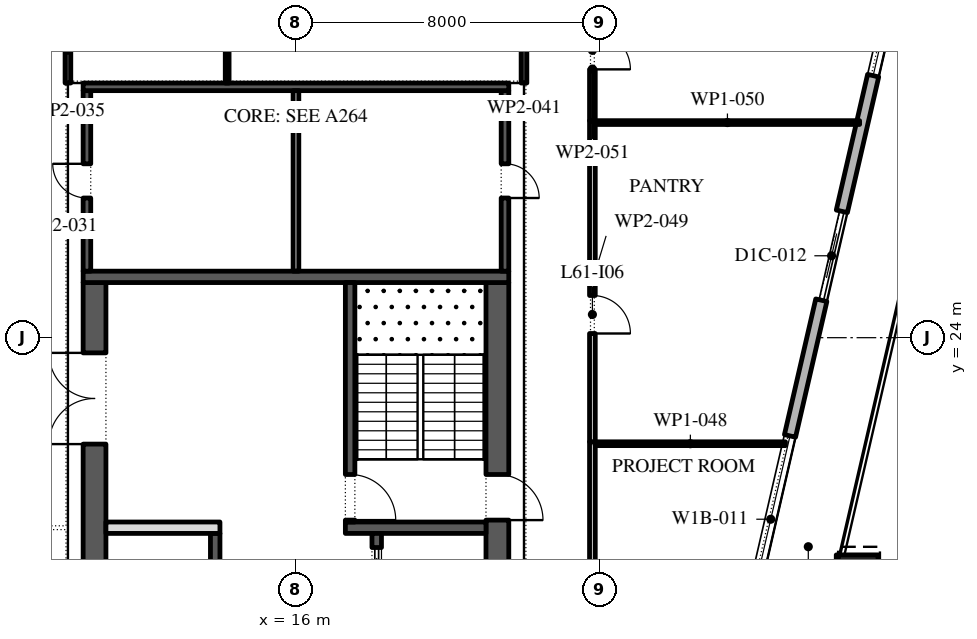
"""IFC4 building model, lengths in metres.
Left out: names, types, materials, properties, quantities, classifications, styles, units other than length and angle.
Written with IfcOpenShell. Run it as: python <this file> out.ifc"""

import sys

from ifc_helpers import new_model, si_unit, direction, frame, frame_2d, origin, origin_2d, place, context, subcontext, project, spatial, rectangle, extrude, element, fill, save


model = new_model("IFC4")
c1 = context("Model", 3, precision=1e-05, world=origin(), true_north=direction((0.0, 1.0)))
c2 = subcontext(c1, "Body", "Model", "MODEL_VIEW")
j1 = project(units=[si_unit("LENGTHUNIT", "METRE"), si_unit("PLANEANGLEUNIT", "RADIAN")], contexts=[c1])
p1 = place(None, origin())
s1 = spatial("IfcSite", under=j1, at=p1, CompositionType="ELEMENT")
p2 = place(p1, origin())
s2 = spatial("IfcBuilding", under=s1, at=p2, CompositionType="ELEMENT")
p3 = place(p2, frame((0.0, 0.0, 280.8)))
s3 = spatial("IfcBuildingStorey", under=s2, at=p3, CompositionType="ELEMENT", Elevation=280.8)
p4 = place(p3, frame((30.766, 17.735, 0.0), z_axis=(0.011668267153, 0.050562490995, 0.998652735462), x_axis=(-0.974391195695, 0.224859506699, 0.0)))
e1 = element("IfcColumn", 1, at=p4, inside=s3, PredefinedType="COLUMN", context=c2, shape_type="SweptSolid", body=[
    extrude(rectangle(XDim=1.1, YDim=1.1, at=origin_2d()), origin(), (0.0, 0.0, 1.0), 4.206),
])
p5 = place(p3, frame((21.359, -11.678, 0.0), z_axis=(0.0, 0.0, 1.0), x_axis=(0.224949198343, 0.974370493275, 0.0)))
e2 = element("IfcWall", 2, at=p5, inside=s3, PredefinedType="STANDARD", context=c2, shape_type="SweptSolid", body=[
    extrude(rectangle(XDim=49.5, YDim=0.3, at=frame_2d((24.75, 0.0))), origin(), (0.0, 0.0, 1.0), 4.0),
])
p6 = place(p5, frame((1.157, 0.0, 0.45)))
e3 = element("IfcOpeningElement", 3, at=p6, cuts=e2, PredefinedType="OPENING", context=c2, shape_type="SweptSolid", body=[
    extrude(rectangle(XDim=4.5, YDim=3.05, at=frame_2d((2.25, 1.525))), frame((0.0, 0.16, 0.0), z_axis=(0.0, -1.0, 0.0), x_axis=(1.0, 0.0, 0.0)), (0.0, 0.0, 1.0), 0.32),
])
p7 = place(p5, frame((8.121, 0.0, 0.45)))
e4 = element("IfcOpeningElement", 4, at=p7, cuts=e2, PredefinedType="OPENING", context=c2, shape_type="SweptSolid", body=[
    extrude(rectangle(XDim=4.5, YDim=3.05, at=frame_2d((2.25, 1.525))), frame((0.0, 0.16, 0.0), z_axis=(0.0, -1.0, 0.0), x_axis=(1.0, 0.0, 0.0)), (0.0, 0.0, 1.0), 0.32),
])
p8 = place(p5, frame((15.236, 0.0, 0.45)))
e5 = element("IfcOpeningElement", 5, at=p8, cuts=e2, PredefinedType="OPENING", context=c2, shape_type="SweptSolid", body=[
    extrude(rectangle(XDim=4.5, YDim=3.05, at=frame_2d((2.25, 1.525))), frame((0.0, 0.16, 0.0), z_axis=(0.0, -1.0, 0.0), x_axis=(1.0, 0.0, 0.0)), (0.0, 0.0, 1.0), 0.32),
])
p9 = place(p5, frame((22.35, 0.0, 0.45)))
e6 = element("IfcOpeningElement", 6, at=p9, cuts=e2, PredefinedType="OPENING", context=c2, shape_type="SweptSolid", body=[
    extrude(rectangle(XDim=4.5, YDim=3.05, at=frame_2d((2.25, 1.525))), frame((0.0, 0.16, 0.0), z_axis=(0.0, -1.0, 0.0), x_axis=(1.0, 0.0, 0.0)), (0.0, 0.0, 1.0), 0.32),
])
p10 = place(p5, frame((29.464, 0.0, 0.45)))
e7 = element("IfcOpeningElement", 7, at=p10, cuts=e2, PredefinedType="OPENING", context=c2, shape_type="SweptSolid", body=[
    extrude(rectangle(XDim=4.5, YDim=2.95, at=frame_2d((2.25, 1.475))), frame((0.0, 0.16, 0.0), z_axis=(0.0, -1.0, 0.0), x_axis=(1.0, 0.0, 0.0)), (0.0, 0.0, 1.0), 0.32),
])
p11 = place(p5, frame((37.628, 0.0, 0.0)))
e8 = element("IfcOpeningElement", 8, at=p11, cuts=e2, PredefinedType="OPENING", context=c2, shape_type="SweptSolid", body=[
    extrude(rectangle(XDim=2.4, YDim=3.325, at=frame_2d((1.2, 1.663))), frame((0.0, 0.16, 0.0), z_axis=(0.0, -1.0, 0.0), x_axis=(1.0, 0.0, 0.0)), (0.0, 0.0, 1.0), 0.32),
])
p12 = place(p5, frame((43.693, 0.0, 0.45)))
e9 = element("IfcOpeningElement", 9, at=p12, cuts=e2, PredefinedType="OPENING", context=c2, shape_type="SweptSolid", body=[
    extrude(rectangle(XDim=4.5, YDim=2.575, at=frame_2d((2.25, 1.288))), frame((0.0, 0.16, 0.0), z_axis=(0.0, -1.0, 0.0), x_axis=(1.0, 0.0, 0.0)), (0.0, 0.0, 1.0), 0.32),
])
p13 = place(p3, frame((21.3, -2.45, 0.0), z_axis=(0.0, 0.0, 1.0), x_axis=(0.0, 1.0, 0.0)))
e10 = element("IfcWall", 10, at=p13, inside=s3, PredefinedType="SHEAR", context=c2, shape_type="SweptSolid", body=[
    extrude(rectangle(XDim=27.9, YDim=0.6, at=frame_2d((13.95, 0.0))), origin(), (0.0, 0.0, 1.0), 4.0),
])
p14 = place(p13, frame((5.05, 0.0, 0.0)))
e11 = element("IfcOpeningElement", 11, at=p14, cuts=e10, PredefinedType="OPENING", context=c2, shape_type="SweptSolid", body=[
    extrude(rectangle(XDim=1.2, YDim=2.1, at=frame_2d((0.6, 1.05))), frame((0.0, 0.31, 0.0), z_axis=(0.0, -1.0, 0.0), x_axis=(1.0, 0.0, 0.0)), (0.0, 0.0, 1.0), 0.62),
])
p15 = place(p13, frame((21.65, 0.0, 0.0)))
e12 = element("IfcOpeningElement", 12, at=p15, cuts=e10, PredefinedType="OPENING", context=c2, shape_type="SweptSolid", body=[
    extrude(rectangle(XDim=1.2, YDim=2.1, at=frame_2d((0.6, 1.05))), frame((0.0, 0.31, 0.0), z_axis=(0.0, -1.0, 0.0), x_axis=(1.0, 0.0, 0.0)), (0.0, 0.0, 1.0), 0.62),
])
p16 = place(p3, frame((10.7, -2.45, 0.0), z_axis=(0.0, 0.0, 1.0), x_axis=(0.0, 1.0, 0.0)))
e13 = element("IfcWall", 13, at=p16, inside=s3, PredefinedType="SHEAR", context=c2, shape_type="SweptSolid", body=[
    extrude(rectangle(XDim=27.9, YDim=0.6, at=frame_2d((13.95, 0.0))), origin(), (0.0, 0.0, 1.0), 4.0),
])
p17 = place(p16, frame((23.65, 0.0, 0.0)))
e14 = element("IfcOpeningElement", 14, at=p17, cuts=e13, PredefinedType="OPENING", context=c2, shape_type="SweptSolid", body=[
    extrude(rectangle(XDim=2.4, YDim=2.1, at=frame_2d((1.2, 1.05))), frame((0.0, 0.31, 0.0), z_axis=(0.0, -1.0, 0.0), x_axis=(1.0, 0.0, 0.0)), (0.0, 0.0, 1.0), 0.62),
])
p18 = place(p16, frame((1.087, 0.0, 0.0)))
e15 = element("IfcOpeningElement", 15, at=p18, cuts=e13, PredefinedType="OPENING", context=c2, shape_type="SweptSolid", body=[
    extrude(rectangle(XDim=0.9, YDim=2.1, at=frame_2d((0.45, 1.05))), frame((0.0, 0.31, 0.0), z_axis=(0.0, -1.0, 0.0), x_axis=(1.0, 0.0, 0.0)), (0.0, 0.0, 1.0), 0.62),
])
p19 = place(p16, frame((4.262, 0.0, 0.0)))
e16 = element("IfcOpeningElement", 16, at=p19, cuts=e13, PredefinedType="OPENING", context=c2, shape_type="SweptSolid", body=[
    extrude(rectangle(XDim=1.0, YDim=2.1, at=frame_2d((0.5, 1.05))), frame((0.0, 0.31, 0.0), z_axis=(0.0, -1.0, 0.0), x_axis=(1.0, 0.0, 0.0)), (0.0, 0.0, 1.0), 0.62),
])
p20 = place(p3, frame((10.4, 25.6, 0.0), z_axis=(0.0, 0.0, 1.0), x_axis=(1.0, 0.0, 0.0)))
e17 = element("IfcWall", 17, at=p20, inside=s3, PredefinedType="SHEAR", context=c2, shape_type="SweptSolid", body=[
    extrude(rectangle(XDim=11.2, YDim=0.3, at=frame_2d((5.6, 0.0))), origin(), (0.0, 0.0, 1.0), 4.0),
])
p21 = place(p3, frame((17.3, 19.0, 0.0), z_axis=(0.0, 0.0, 1.0), x_axis=(1.0, 0.0, 0.0)))
e18 = element("IfcWall", 18, at=p21, inside=s3, PredefinedType="SHEAR", context=c2, shape_type="SweptSolid", body=[
    extrude(rectangle(XDim=3.7, YDim=0.3, at=frame_2d((1.85, 0.0))), origin(), (0.0, 0.0, 1.0), 4.0),
])
p22 = place(p3, frame((17.425, 19.15, 0.0), z_axis=(0.0, 0.0, 1.0), x_axis=(0.0, 1.0, 0.0)))
e19 = element("IfcWall", 19, at=p22, inside=s3, PredefinedType="SHEAR", context=c2, shape_type="SweptSolid", body=[
    extrude(rectangle(XDim=6.3, YDim=0.25, at=frame_2d((3.15, 0.0))), origin(), (0.0, 0.0, 1.0), 4.0),
])
p23 = place(p22, frame((0.05, 0.0, 0.0)))
e20 = element("IfcOpeningElement", 20, at=p23, cuts=e19, PredefinedType="OPENING", context=c2, shape_type="SweptSolid", body=[
    extrude(rectangle(XDim=1.2, YDim=2.1, at=frame_2d((0.6, 1.05))), frame((0.0, 0.135, 0.0), z_axis=(0.0, -1.0, 0.0), x_axis=(1.0, 0.0, 0.0)), (0.0, 0.0, 1.0), 0.27),
])
p24 = place(p3, frame((18.125, 4.15, 0.0), z_axis=(0.0, 0.0, 1.0), x_axis=(0.0, 1.0, 0.0)))
e21 = element("IfcWall", 21, at=p24, inside=s3, PredefinedType="SHEAR", context=c2, shape_type="SweptSolid", body=[
    extrude(rectangle(XDim=14.7, YDim=0.25, at=frame_2d((7.35, 0.0))), origin(), (0.0, 0.0, 1.0), 4.0),
])
p25 = place(p24, frame((3.246, 0.0, 0.0)))
e22 = element("IfcOpeningElement", 22, at=p25, cuts=e21, PredefinedType="OPENING", context=c2, shape_type="SweptSolid", body=[
    extrude(rectangle(XDim=0.9, YDim=2.1, at=frame_2d((0.45, 1.05))), frame((0.0, 0.135, 0.0), z_axis=(0.0, -1.0, 0.0), x_axis=(1.0, 0.0, 0.0)), (0.0, 0.0, 1.0), 0.27),
])
p26 = place(p24, frame((8.454, 0.0, 0.0)))
e23 = element("IfcOpeningElement", 23, at=p26, cuts=e21, PredefinedType="OPENING", context=c2, shape_type="SweptSolid", body=[
    extrude(rectangle(XDim=0.9, YDim=2.1, at=frame_2d((0.45, 1.05))), frame((0.0, 0.135, 0.0), z_axis=(0.0, -1.0, 0.0), x_axis=(1.0, 0.0, 0.0)), (0.0, 0.0, 1.0), 0.27),
])
p27 = place(p24, frame((0.371, 0.0, 0.0)))
e24 = element("IfcOpeningElement", 24, at=p27, cuts=e21, PredefinedType="OPENING", context=c2, shape_type="SweptSolid", body=[
    extrude(rectangle(XDim=1.1, YDim=2.1, at=frame_2d((0.55, 1.05))), frame((0.0, 0.135, 0.0), z_axis=(0.0, -1.0, 0.0), x_axis=(1.0, 0.0, 0.0)), (0.0, 0.0, 1.0), 0.27),
])
p28 = place(p24, frame((13.229, 0.0, 0.0)))
e25 = element("IfcOpeningElement", 25, at=p28, cuts=e21, PredefinedType="OPENING", context=c2, shape_type="SweptSolid", body=[
    extrude(rectangle(XDim=1.1, YDim=2.1, at=frame_2d((0.55, 1.05))), frame((0.0, 0.135, 0.0), z_axis=(0.0, -1.0, 0.0), x_axis=(1.0, 0.0, 0.0)), (0.0, 0.0, 1.0), 0.27),
])
p29 = place(p3, frame((13.875, -2.45, 0.0), z_axis=(0.0, 0.0, 1.0), x_axis=(0.0, 1.0, 0.0)))
e26 = element("IfcWall", 26, at=p29, inside=s3, PredefinedType="SHEAR", context=c2, shape_type="SweptSolid", body=[
    extrude(rectangle(XDim=21.3, YDim=0.25, at=frame_2d((10.65, 0.0))), origin(), (0.0, 0.0, 1.0), 4.0),
])
p30 = place(p29, frame((16.261, 0.0, 0.0)))
e27 = element("IfcOpeningElement", 27, at=p30, cuts=e26, PredefinedType="OPENING", context=c2, shape_type="SweptSolid", body=[
    extrude(rectangle(XDim=0.9, YDim=2.1, at=frame_2d((0.45, 1.05))), frame((0.0, 0.135, 0.0), z_axis=(0.0, -1.0, 0.0), x_axis=(1.0, 0.0, 0.0)), (0.0, 0.0, 1.0), 0.27),
])
p31 = place(p29, frame((19.325, 0.0, 0.0)))
e28 = element("IfcOpeningElement", 28, at=p31, cuts=e26, PredefinedType="OPENING", context=c2, shape_type="SweptSolid", body=[
    extrude(rectangle(XDim=0.9, YDim=2.1, at=frame_2d((0.45, 1.05))), frame((0.0, 0.135, 0.0), z_axis=(0.0, -1.0, 0.0), x_axis=(1.0, 0.0, 0.0)), (0.0, 0.0, 1.0), 0.27),
])
p32 = place(p29, frame((6.971, 0.0, 0.0)))
e29 = element("IfcOpeningElement", 29, at=p32, cuts=e26, PredefinedType="OPENING", context=c2, shape_type="SweptSolid", body=[
    extrude(rectangle(XDim=1.1, YDim=2.1, at=frame_2d((0.55, 1.05))), frame((0.0, 0.135, 0.0), z_axis=(0.0, -1.0, 0.0), x_axis=(1.0, 0.0, 0.0)), (0.0, 0.0, 1.0), 0.27),
])
p33 = place(p29, frame((9.114, 0.0, 0.0)))
e30 = element("IfcOpeningElement", 30, at=p33, cuts=e26, PredefinedType="OPENING", context=c2, shape_type="SweptSolid", body=[
    extrude(rectangle(XDim=1.1, YDim=2.1, at=frame_2d((0.55, 1.05))), frame((0.0, 0.135, 0.0), z_axis=(0.0, -1.0, 0.0), x_axis=(1.0, 0.0, 0.0)), (0.0, 0.0, 1.0), 0.27),
])
p34 = place(p29, frame((11.257, 0.0, 0.0)))
e31 = element("IfcOpeningElement", 31, at=p34, cuts=e26, PredefinedType="OPENING", context=c2, shape_type="SweptSolid", body=[
    extrude(rectangle(XDim=1.1, YDim=2.1, at=frame_2d((0.55, 1.05))), frame((0.0, 0.135, 0.0), z_axis=(0.0, -1.0, 0.0), x_axis=(1.0, 0.0, 0.0)), (0.0, 0.0, 1.0), 0.27),
])
p35 = place(p29, frame((13.4, 0.0, 0.0)))
e32 = element("IfcOpeningElement", 32, at=p35, cuts=e26, PredefinedType="OPENING", context=c2, shape_type="SweptSolid", body=[
    extrude(rectangle(XDim=1.1, YDim=2.1, at=frame_2d((0.55, 1.05))), frame((0.0, 0.135, 0.0), z_axis=(0.0, -1.0, 0.0), x_axis=(1.0, 0.0, 0.0)), (0.0, 0.0, 1.0), 0.27),
])
p36 = place(p3, frame((11.0, 19.0, 0.0), z_axis=(0.0, 0.0, 1.0), x_axis=(1.0, 0.0, 0.0)))
e33 = element("IfcWall", 33, at=p36, inside=s3, PredefinedType="PARTITIONING", context=c2, shape_type="SweptSolid", body=[
    extrude(rectangle(XDim=3.0, YDim=0.3, at=frame_2d((1.5, 0.0))), origin(), (0.0, 0.0, 1.0), 4.0),
])
p37 = place(p3, frame((21.5, 25.75, 0.0), z_axis=(0.0, 0.0, 1.0), x_axis=(0.0, 1.0, 0.0)))
e34 = element("IfcWall", 34, at=p37, inside=s3, PredefinedType="SHEAR", context=c2, shape_type="SweptSolid", body=[
    extrude(rectangle(XDim=4.75, YDim=0.2, at=frame_2d((2.375, 0.0))), origin(), (0.0, 0.0, 1.0), 4.0),
])
p38 = place(p37, frame((1.925, 0.0, 0.0)))
e35 = element("IfcOpeningElement", 35, at=p38, cuts=e34, PredefinedType="OPENING", context=c2, shape_type="SweptSolid", body=[
    extrude(rectangle(XDim=0.9, YDim=2.1, at=frame_2d((0.45, 1.05))), frame((0.0, 0.11, 0.0), z_axis=(0.0, -1.0, 0.0), x_axis=(1.0, 0.0, 0.0)), (0.0, 0.0, 1.0), 0.22),
])
p39 = place(p3, frame((10.5, 25.75, 0.0), z_axis=(0.0, 0.0, 1.0), x_axis=(0.0, 1.0, 0.0)))
e36 = element("IfcWall", 36, at=p39, inside=s3, PredefinedType="SHEAR", context=c2, shape_type="SweptSolid", body=[
    extrude(rectangle(XDim=4.75, YDim=0.2, at=frame_2d((2.375, 0.0))), origin(), (0.0, 0.0, 1.0), 4.0),
])
p40 = place(p39, frame((1.925, 0.0, 0.0)))
e37 = element("IfcOpeningElement", 37, at=p40, cuts=e36, PredefinedType="OPENING", context=c2, shape_type="SweptSolid", body=[
    extrude(rectangle(XDim=0.9, YDim=2.1, at=frame_2d((0.45, 1.05))), frame((0.0, 0.11, 0.0), z_axis=(0.0, -1.0, 0.0), x_axis=(1.0, 0.0, 0.0)), (0.0, 0.0, 1.0), 0.22),
])
p41 = place(p3, frame((10.4, 30.6, 0.0), z_axis=(0.0, 0.0, 1.0), x_axis=(1.0, 0.0, 0.0)))
e38 = element("IfcWall", 38, at=p41, inside=s3, PredefinedType="SHEAR", context=c2, shape_type="SweptSolid", body=[
    extrude(rectangle(XDim=11.2, YDim=0.2, at=frame_2d((5.6, 0.0))), origin(), (0.0, 0.0, 1.0), 4.0),
])
p42 = place(p3, frame((16.0, 25.75, 0.0), z_axis=(0.0, 0.0, 1.0), x_axis=(0.0, 1.0, 0.0)))
e39 = element("IfcWall", 39, at=p42, inside=s3, PredefinedType="PARTITIONING", context=c2, shape_type="SweptSolid", body=[
    extrude(rectangle(XDim=4.75, YDim=0.15, at=frame_2d((2.375, 0.0))), origin(), (0.0, 0.0, 1.0), 4.0),
])
p43 = place(p3, frame((10.0, 32.425, 0.0), z_axis=(0.0, 0.0, 1.0), x_axis=(0.0, -1.0, 0.0)))
e40 = element("IfcWall", 40, at=p43, inside=s3, PredefinedType="PARTITIONING", context=c2, shape_type="SweptSolid", body=[
    extrude(rectangle(XDim=1.725, YDim=0.15, at=frame_2d((0.863, 0.0))), origin(), (0.0, 0.0, 1.0), 4.0),
])
p44 = place(p3, frame((14.19, 34.95, 0.0), z_axis=(0.0, 0.0, 1.0), x_axis=(0.0, -1.0, 0.0)))
e41 = element("IfcWall", 41, at=p44, inside=s3, PredefinedType="PARTITIONING", context=c2, shape_type="SweptSolid", body=[
    extrude(rectangle(XDim=4.25, YDim=0.1, at=frame_2d((2.125, 0.0))), origin(), (0.0, 0.0, 1.0), 4.0),
])
p45 = place(p44, frame((2.4, 0.0, 0.0)))
e42 = element("IfcOpeningElement", 42, at=p45, cuts=e41, PredefinedType="OPENING", context=c2, shape_type="SweptSolid", body=[
    extrude(rectangle(XDim=0.9, YDim=2.1, at=frame_2d((0.45, 1.05))), frame((0.0, 0.06, 0.0), z_axis=(0.0, -1.0, 0.0), x_axis=(1.0, 0.0, 0.0)), (0.0, 0.0, 1.0), 0.12),
])
p46 = place(p3, frame((22.0, 30.7, 0.0), z_axis=(0.0, 0.0, 1.0), x_axis=(0.0, 1.0, 0.0)))
e43 = element("IfcWall", 43, at=p46, inside=s3, PredefinedType="PARTITIONING", context=c2, shape_type="SweptSolid", body=[
    extrude(rectangle(XDim=1.875, YDim=0.15, at=frame_2d((0.938, 0.0))), origin(), (0.0, 0.0, 1.0), 4.0),
])
p47 = place(p3, frame((23.8, 21.26, 0.0), z_axis=(0.0, 0.0, 1.0), x_axis=(0.0, -1.0, 0.0)))
e44 = element("IfcWall", 44, at=p47, inside=s3, PredefinedType="PARTITIONING", context=c2, shape_type="SweptSolid", body=[
    extrude(rectangle(XDim=18.325, YDim=0.15, at=frame_2d((9.163, 0.0))), origin(), (0.0, 0.0, 1.0), 4.0),
])
p48 = place(p47, frame((5.0, 0.0, 0.0)))
e45 = element("IfcOpeningElement", 45, at=p48, cuts=e44, PredefinedType="OPENING", context=c2, shape_type="SweptSolid", body=[
    extrude(rectangle(XDim=1.0, YDim=2.1, at=frame_2d((0.5, 1.05))), frame((0.0, 0.085, 0.0), z_axis=(0.0, -1.0, 0.0), x_axis=(1.0, 0.0, 0.0)), (0.0, 0.0, 1.0), 0.17),
])
p49 = place(p3, frame((23.875, 21.21, 0.0), z_axis=(0.0, 0.0, 1.0), x_axis=(1.0, 0.0, 0.0)))
e46 = element("IfcWall", 46, at=p49, inside=s3, PredefinedType="PARTITIONING", context=c2, shape_type="SweptSolid", body=[
    extrude(rectangle(XDim=5.005, YDim=0.1, at=frame_2d((2.502, 0.0))), origin(), (0.0, 0.0, 1.0), 4.0),
])
p50 = place(p3, frame((23.8, 29.71, 0.0), z_axis=(0.0, 0.0, 1.0), x_axis=(0.0, -1.0, 0.0)))
e47 = element("IfcWall", 47, at=p50, inside=s3, PredefinedType="PARTITIONING", context=c2, shape_type="SweptSolid", body=[
    extrude(rectangle(XDim=8.45, YDim=0.15, at=frame_2d((4.225, 0.0))), origin(), (0.0, 0.0, 1.0), 4.0),
])
p51 = place(p50, frame((4.6, 0.0, 0.0)))
e48 = element("IfcOpeningElement", 48, at=p51, cuts=e47, PredefinedType="OPENING", context=c2, shape_type="SweptSolid", body=[
    extrude(rectangle(XDim=1.0, YDim=2.1, at=frame_2d((0.5, 1.05))), frame((0.0, 0.085, 0.0), z_axis=(0.0, -1.0, 0.0), x_axis=(1.0, 0.0, 0.0)), (0.0, 0.0, 1.0), 0.17),
])
p52 = place(p3, frame((23.875, 29.66, 0.0), z_axis=(0.0, 0.0, 1.0), x_axis=(1.0, 0.0, 0.0)))
e49 = element("IfcWall", 49, at=p52, inside=s3, PredefinedType="PARTITIONING", context=c2, shape_type="SweptSolid", body=[
    extrude(rectangle(XDim=6.956, YDim=0.1, at=frame_2d((3.478, 0.0))), origin(), (0.0, 0.0, 1.0), 4.0),
])
p53 = place(p3, frame((23.8, 32.425, 0.0), z_axis=(0.0, 0.0, 1.0), x_axis=(0.0, -1.0, 0.0)))
e50 = element("IfcWall", 50, at=p53, inside=s3, PredefinedType="PARTITIONING", context=c2, shape_type="SweptSolid", body=[
    extrude(rectangle(XDim=2.715, YDim=0.15, at=frame_2d((1.357, 0.0))), origin(), (0.0, 0.0, 1.0), 4.0),
])
p54 = place(p53, frame((0.365, 0.0, 0.0)))
e51 = element("IfcOpeningElement", 51, at=p54, cuts=e50, PredefinedType="OPENING", context=c2, shape_type="SweptSolid", body=[
    extrude(rectangle(XDim=1.0, YDim=2.1, at=frame_2d((0.5, 1.05))), frame((0.0, 0.085, 0.0), z_axis=(0.0, -1.0, 0.0), x_axis=(1.0, 0.0, 0.0)), (0.0, 0.0, 1.0), 0.17),
])
p55 = place(p10, origin())
e52 = element("IfcWindow", 52, at=p55, inside=s3, PartitioningType="DOUBLE_PANEL_VERTICAL", PredefinedType="WINDOW", context=c2, shape_type="SweptSolid", body=[
    extrude(rectangle(XDim=4.5, YDim=2.95, at=frame_2d((2.25, 1.475))), frame((0.0, 0.03, 0.0), z_axis=(0.0, -1.0, 0.0), x_axis=(1.0, 0.0, 0.0)), (0.0, 0.0, 1.0), 0.06),
])
fill(e7, e52)
p56 = place(p11, origin())
e53 = element("IfcDoor", 53, at=p56, inside=s3, OperationType="DOUBLE_DOOR_SLIDING", PredefinedType="DOOR", context=c2, shape_type="SweptSolid", body=[
    extrude(rectangle(XDim=2.4, YDim=3.325, at=frame_2d((1.2, 1.663))), frame((0.0, 0.025, 0.0), z_axis=(0.0, -1.0, 0.0), x_axis=(1.0, 0.0, 0.0)), (0.0, 0.0, 1.0), 0.05),
])
fill(e8, e53)
p57 = place(p12, origin())
e54 = element("IfcWindow", 54, at=p57, inside=s3, PartitioningType="DOUBLE_PANEL_VERTICAL", PredefinedType="WINDOW", context=c2, shape_type="SweptSolid", body=[
    extrude(rectangle(XDim=4.5, YDim=2.575, at=frame_2d((2.25, 1.288))), frame((0.0, 0.03, 0.0), z_axis=(0.0, -1.0, 0.0), x_axis=(1.0, 0.0, 0.0)), (0.0, 0.0, 1.0), 0.06),
])
fill(e9, e54)
p58 = place(p28, origin())
e55 = element("IfcDoor", 55, at=p58, inside=s3, OperationType="SLIDING_TO_LEFT", PredefinedType="DOOR", context=c2, shape_type="SweptSolid", body=[
    extrude(rectangle(XDim=1.1, YDim=2.1, at=frame_2d((0.55, 1.05))), frame((0.0, 0.025, 0.0), z_axis=(0.0, -1.0, 0.0), x_axis=(1.0, 0.0, 0.0)), (0.0, 0.0, 1.0), 0.05),
])
fill(e25, e55)
p59 = place(p17, origin())
e56 = element("IfcDoor", 56, at=p59, inside=s3, OperationType="DOUBLE_DOOR_SINGLE_SWING", PredefinedType="DOOR", context=c2, shape_type="SweptSolid", body=[
    extrude(rectangle(XDim=2.4, YDim=2.1, at=frame_2d((1.2, 1.05))), frame((0.0, 0.025, 0.0), z_axis=(0.0, -1.0, 0.0), x_axis=(1.0, 0.0, 0.0)), (0.0, 0.0, 1.0), 0.05),
])
fill(e14, e56)
p60 = place(p23, frame((1.2, 0.0, 0.0), z_axis=(0.0, 0.0, 1.0), x_axis=(-1.0, 0.0, 0.0)))
e57 = element("IfcDoor", 57, at=p60, inside=s3, OperationType="SINGLE_SWING_LEFT", PredefinedType="DOOR", context=c2, shape_type="SweptSolid", body=[
    extrude(rectangle(XDim=1.2, YDim=2.1, at=frame_2d((0.6, 1.05))), frame((0.0, 0.025, 0.0), z_axis=(0.0, -1.0, 0.0), x_axis=(1.0, 0.0, 0.0)), (0.0, 0.0, 1.0), 0.05),
])
fill(e20, e57)
p61 = place(p15, frame((1.2, 0.0, 0.0), z_axis=(0.0, 0.0, 1.0), x_axis=(-1.0, 0.0, 0.0)))
e58 = element("IfcDoor", 58, at=p61, inside=s3, OperationType="SINGLE_SWING_LEFT", PredefinedType="DOOR", context=c2, shape_type="SweptSolid", body=[
    extrude(rectangle(XDim=1.2, YDim=2.1, at=frame_2d((0.6, 1.05))), frame((0.0, 0.025, 0.0), z_axis=(0.0, -1.0, 0.0), x_axis=(1.0, 0.0, 0.0)), (0.0, 0.0, 1.0), 0.05),
])
fill(e12, e58)
p62 = place(p38, frame((0.9, 0.15, 0.0), z_axis=(0.0, 0.0, 1.0), x_axis=(-1.0, 0.0, 0.0)))
e59 = element("IfcDoor", 59, at=p62, inside=s3, OperationType="SINGLE_SWING_LEFT", PredefinedType="DOOR", context=c2, shape_type="SweptSolid", body=[
    extrude(rectangle(XDim=0.9, YDim=2.1, at=frame_2d((0.45, 1.05))), frame((0.0, 0.1, 0.0), z_axis=(0.0, -1.0, 0.0), x_axis=(1.0, 0.0, 0.0)), (0.0, 0.0, 1.0), 0.05),
])
fill(e35, e59)
p63 = place(p40, origin())
e60 = element("IfcDoor", 60, at=p63, inside=s3, OperationType="SINGLE_SWING_LEFT", PredefinedType="DOOR", context=c2, shape_type="SweptSolid", body=[
    extrude(rectangle(XDim=0.9, YDim=2.1, at=frame_2d((0.45, 1.05))), frame((0.0, -0.05, 0.0), z_axis=(0.0, -1.0, 0.0), x_axis=(1.0, 0.0, 0.0)), (0.0, 0.0, 1.0), 0.05),
])
fill(e37, e60)
p64 = place(p51, origin())
e61 = element("IfcDoor", 61, at=p64, inside=s3, OperationType="SINGLE_SWING_LEFT", PredefinedType="DOOR", context=c2, shape_type="SweptSolid", body=[
    extrude(rectangle(XDim=1.0, YDim=2.1, at=frame_2d((0.5, 1.05))), frame((0.0, 0.025, 0.0), z_axis=(0.0, -1.0, 0.0), x_axis=(1.0, 0.0, 0.0)), (0.0, 0.0, 1.0), 0.05),
])
fill(e48, e61)
p65 = place(p54, origin())
e62 = element("IfcDoor", 62, at=p65, inside=s3, OperationType="SINGLE_SWING_LEFT", PredefinedType="DOOR", context=c2, shape_type="SweptSolid", body=[
    extrude(rectangle(XDim=1.0, YDim=2.1, at=frame_2d((0.5, 1.05))), frame((0.0, 0.025, 0.0), z_axis=(0.0, -1.0, 0.0), x_axis=(1.0, 0.0, 0.0)), (0.0, 0.0, 1.0), 0.05),
])
fill(e51, e62)
save(model, sys.argv[1])
